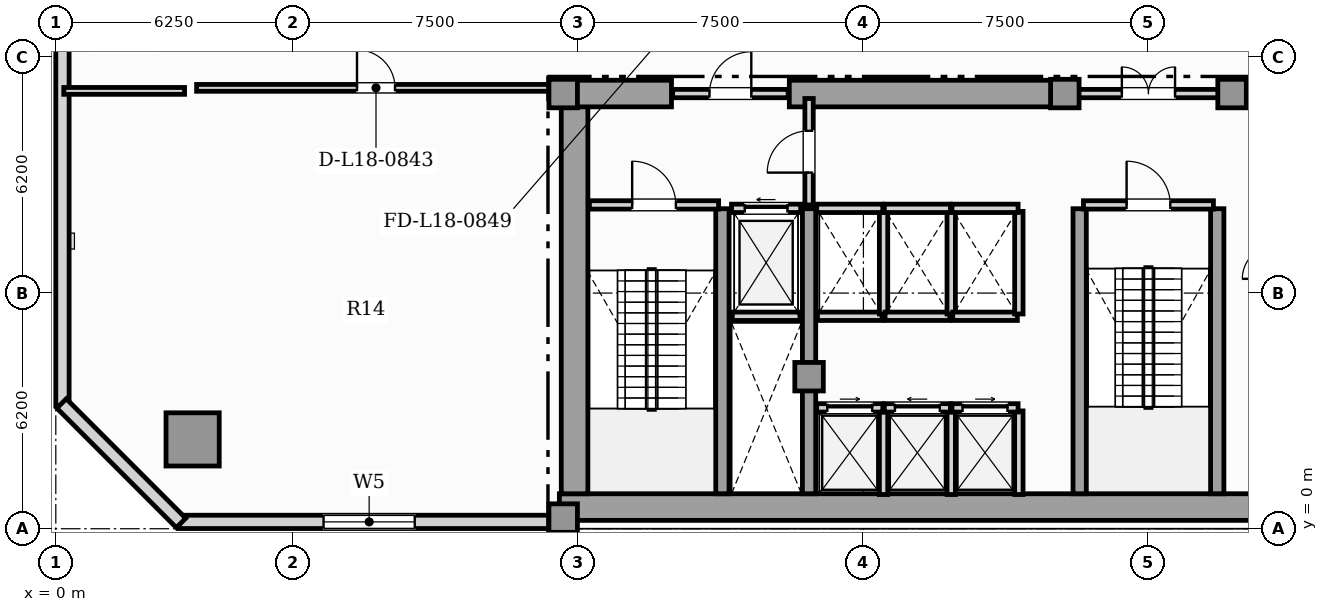
"""IFC4 building model, lengths in metres.
Left out: names, types, materials, properties, quantities, classifications, styles, units other than length and angle.
Written with IfcOpenShell. Run it as: python <this file> out.ifc"""

import sys

from ifc_helpers import new_model, si_unit, direction, frame, frame_2d, origin, origin_2d, place, context, subcontext, project, spatial, rectangle, hollow_rectangle, extrude, element, fill, save


model = new_model("IFC4")
c1 = context("Model", 3, precision=1e-05, world=origin(), true_north=direction((0.0, 1.0)))
c2 = subcontext(c1, "Body", "Model", "MODEL_VIEW")
j1 = project(units=[si_unit("LENGTHUNIT", "METRE"), si_unit("PLANEANGLEUNIT", "RADIAN")], contexts=[c1])
p1 = place(None, origin())
s1 = spatial("IfcSite", under=j1, at=p1, CompositionType="ELEMENT")
p2 = place(p1, origin())
s2 = spatial("IfcBuilding", under=s1, at=p2, CompositionType="ELEMENT")
p3 = place(p2, frame((0.0, 0.0, 76.0)))
s3 = spatial("IfcBuildingStorey", under=s2, at=p3, CompositionType="ELEMENT", Elevation=76.0)
p4 = place(p3, frame((13.25, 0.57, 0.0), z_axis=(0.0, 0.0, 1.0), x_axis=(1.0, 0.0, 0.0)))
e1 = element("IfcWall", 1, at=p4, inside=s3, PredefinedType="SHEAR", context=c2, shape_type="SweptSolid", body=[
    extrude(rectangle(XDim=31.0, YDim=0.7, at=frame_2d((15.5, 0.0))), origin(), (0.0, 0.0, 1.0), 4.8),
])
p5 = place(p3, frame((13.65, 0.92, 0.0), z_axis=(0.0, 0.0, 1.0), x_axis=(0.0, 1.0, 0.0)))
e2 = element("IfcWall", 2, at=p5, inside=s3, PredefinedType="SHEAR", context=c2, shape_type="SweptSolid", body=[
    extrude(rectangle(XDim=10.53, YDim=0.7, at=frame_2d((5.265, 0.0))), origin(), (0.0, 0.0, 1.0), 4.8),
])
p6 = place(p3, frame((13.25, 11.45, 0.0), z_axis=(0.0, 0.0, 1.0), x_axis=(1.0, 0.0, 0.0)))
e3 = element("IfcWall", 3, at=p6, inside=s3, PredefinedType="SHEAR", context=c2, shape_type="SweptSolid", body=[
    extrude(rectangle(XDim=2.95, YDim=0.7, at=frame_2d((1.475, 0.0))), origin(), (0.0, 0.0, 1.0), 4.8),
])
for number, where, z_axis, x_axis in (
    (4, (19.3, 11.45, 0.0), (0.0, 0.0, 1.0), (1.0, 0.0, 0.0)),
    (5, (30.9, 11.45, 0.0), (0.0, 0.0, 1.0), (1.0, 0.0, 0.0)),
):
    element("IfcWall", number, at=place(p3, frame(where, z_axis=z_axis, x_axis=x_axis)), inside=s3, PredefinedType="SHEAR", context=c2, shape_type="SweptSolid", body=[
        extrude(rectangle(XDim=7.3, YDim=0.7, at=frame_2d((3.65, 0.0))), origin(), (0.0, 0.0, 1.0), 4.8),
    ])
for number, where, z_axis, x_axis in (
    (6, (17.54, 0.92, 0.0), (0.0, 0.0, 1.0), (0.0, 1.0, 0.0)),
    (7, (19.82, 0.92, 0.0), (0.0, 0.0, 1.0), (0.0, 1.0, 0.0)),
    (8, (26.94, 0.92, 0.0), (0.0, 0.0, 1.0), (0.0, 1.0, 0.0)),
    (9, (30.56, 0.92, 0.0), (0.0, 0.0, 1.0), (0.0, 1.0, 0.0)),
):
    element("IfcWall", number, at=place(p3, frame(where, z_axis=z_axis, x_axis=x_axis)), inside=s3, PredefinedType="SHEAR", context=c2, shape_type="SweptSolid", body=[
        extrude(rectangle(XDim=7.5, YDim=0.35, at=frame_2d((3.75, 0.0))), origin(), (0.0, 0.0, 1.0), 4.8),
    ])
for number, where, z_axis, x_axis in (
    (10, (13.35, 0.28, 0.0), (0.0, 0.0, 1.0), (1.0, 0.0, 0.0)),
    (11, (13.35, 11.45, 0.0), (0.0, 0.0, 1.0), (1.0, 0.0, 0.0)),
    (12, (19.82, 4.0, 0.0), (0.0, 0.0, 1.0), (1.0, 0.0, 0.0)),
    (13, (26.55, 11.45, 0.0), (0.0, 0.0, 1.0), (1.0, 0.0, 0.0)),
    (14, (30.95, 11.45, 0.0), (0.0, 0.0, 1.0), (1.0, 0.0, 0.0)),
):
    element("IfcColumn", number, at=place(p3, frame(where, z_axis=z_axis, x_axis=x_axis)), inside=s3, PredefinedType="COLUMN", context=c2, shape_type="SweptSolid", body=[
        extrude(rectangle(XDim=0.75, YDim=0.75, at=origin_2d()), origin(), (0.0, 0.0, 1.0), 5.05),
    ])
p7 = place(p3, frame((3.6, 2.35, 0.0), z_axis=(0.0, 0.0, 1.0), x_axis=(1.0, 0.0, 0.0)))
e15 = element("IfcColumn", 15, at=p7, inside=s3, PredefinedType="USERDEFINED", context=c2, shape_type="SweptSolid", body=[
    extrude(hollow_rectangle(XDim=1.4, YDim=1.4, WallThickness=0.08, at=origin_2d()), origin(), (0.0, 0.0, 1.0), 5.05),
])
p8 = place(p3, frame((3.24, 0.18, 0.0), z_axis=(0.0, 0.0, 1.0), x_axis=(1.0, 0.0, 0.0)))
e16 = element("IfcWall", 16, at=p8, inside=s3, PredefinedType="SOLIDWALL", context=c2, shape_type="SweptSolid", body=[
    extrude(rectangle(XDim=10.01, YDim=0.35, at=frame_2d((5.005, 0.0))), origin(), (0.0, 0.0, 1.0), 4.8),
])
p9 = place(p8, frame((3.805, 0.0, 0.85)))
e17 = element("IfcOpeningElement", 17, at=p9, cuts=e16, PredefinedType="OPENING", context=c2, shape_type="SweptSolid", body=[
    extrude(rectangle(XDim=2.4, YDim=2.0, at=frame_2d((1.2, 1.0))), frame((0.0, 0.185, 0.0), z_axis=(0.0, -1.0, 0.0), x_axis=(1.0, 0.0, 0.0)), (0.0, 0.0, 1.0), 0.37),
])
p10 = place(p3, frame((0.175, 43.16, 0.0), z_axis=(0.0, 0.0, 1.0), x_axis=(0.0, -1.0, 0.0)))
e18 = element("IfcWall", 18, at=p10, inside=s3, PredefinedType="SOLIDWALL", context=c2, shape_type="SweptSolid", body=[
    extrude(rectangle(XDim=39.92, YDim=0.35, at=frame_2d((19.96, 0.0))), origin(), (0.0, 0.0, 1.0), 4.8),
])
p11 = place(p10, frame((20.24, 0.0, 0.85)))
e19 = element("IfcOpeningElement", 19, at=p11, cuts=e18, PredefinedType="OPENING", context=c2, shape_type="SweptSolid", body=[
    extrude(rectangle(XDim=2.4, YDim=2.0, at=frame_2d((1.2, 1.0))), frame((0.0, 0.185, 0.0), z_axis=(0.0, -1.0, 0.0), x_axis=(1.0, 0.0, 0.0)), (0.0, 0.0, 1.0), 0.37),
])
p12 = place(p3, frame((0.152, 3.295, 0.0), z_axis=(0.0, 0.0, 1.0), x_axis=(0.707106781187, -0.707106781187, 0.0)))
e20 = element("IfcWall", 20, at=p12, inside=s3, PredefinedType="SOLIDWALL", context=c2, shape_type="SweptSolid", body=[
    extrude(rectangle(XDim=4.445, YDim=0.35, at=frame_2d((2.223, 0.0))), origin(), (0.0, 0.0, 1.0), 4.8),
])
p13 = place(p3, frame((17.8, 5.59, 0.0), z_axis=(0.0, 0.0, 1.0), x_axis=(1.0, 0.0, 0.0)))
e21 = element("IfcWall", 21, at=p13, inside=s3, PredefinedType="SOLIDWALL", context=c2, shape_type="SweptSolid", body=[
    extrude(rectangle(XDim=1.78, YDim=0.22, at=frame_2d((0.89, 0.0))), origin(), (0.0, 0.0, 1.0), 4.8),
])
p14 = place(p3, frame((17.78, 8.43, 0.0), z_axis=(0.0, 0.0, 1.0), x_axis=(1.0, 0.0, 0.0)))
e22 = element("IfcWall", 22, at=p14, inside=s3, PredefinedType="SOLIDWALL", context=c2, shape_type="SweptSolid", body=[
    extrude(rectangle(XDim=1.82, YDim=0.22, at=frame_2d((0.91, 0.0))), origin(), (0.0, 0.0, 1.0), 4.8),
])
p15 = place(p14, frame((0.35, 0.0, 0.0)))
e23 = element("IfcOpeningElement", 23, at=p15, cuts=e22, PredefinedType="OPENING", context=c2, shape_type="SweptSolid", body=[
    extrude(rectangle(XDim=1.12, YDim=2.25, at=frame_2d((0.56, 1.125))), frame((0.0, 0.12, 0.0), z_axis=(0.0, -1.0, 0.0), x_axis=(1.0, 0.0, 0.0)), (0.0, 0.0, 1.0), 0.24),
])
p16 = place(p3, frame((21.78, 0.9, 0.0), z_axis=(0.0, 0.0, 1.0), x_axis=(0.0, 1.0, 0.0)))
e24 = element("IfcWall", 24, at=p16, inside=s3, PredefinedType="SOLIDWALL", context=c2, shape_type="SweptSolid", body=[
    extrude(rectangle(XDim=2.2, YDim=0.22, at=frame_2d((1.1, 0.0))), origin(), (0.0, 0.0, 1.0), 4.8),
])
p17 = place(p3, frame((20.02, 3.18, 0.0), z_axis=(0.0, 0.0, 1.0), x_axis=(1.0, 0.0, 0.0)))
e25 = element("IfcWall", 25, at=p17, inside=s3, PredefinedType="SOLIDWALL", context=c2, shape_type="SweptSolid", body=[
    extrude(rectangle(XDim=1.74, YDim=0.22, at=frame_2d((0.87, 0.0))), origin(), (0.0, 0.0, 1.0), 4.8),
])
p18 = place(p17, frame((0.28, 0.0, 0.0)))
e26 = element("IfcOpeningElement", 26, at=p18, cuts=e25, PredefinedType="OPENING", context=c2, shape_type="SweptSolid", body=[
    extrude(rectangle(XDim=1.18, YDim=2.2, at=frame_2d((0.59, 1.1))), frame((0.0, 0.12, 0.0), z_axis=(0.0, -1.0, 0.0), x_axis=(1.0, 0.0, 0.0)), (0.0, 0.0, 1.0), 0.24),
])
p19 = place(p3, frame((23.56, 0.9, 0.0), z_axis=(0.0, 0.0, 1.0), x_axis=(0.0, 1.0, 0.0)))
e27 = element("IfcWall", 27, at=p19, inside=s3, PredefinedType="SOLIDWALL", context=c2, shape_type="SweptSolid", body=[
    extrude(rectangle(XDim=2.2, YDim=0.22, at=frame_2d((1.1, 0.0))), origin(), (0.0, 0.0, 1.0), 4.8),
])
p20 = place(p3, frame((21.8, 3.18, 0.0), z_axis=(0.0, 0.0, 1.0), x_axis=(1.0, 0.0, 0.0)))
e28 = element("IfcWall", 28, at=p20, inside=s3, PredefinedType="SOLIDWALL", context=c2, shape_type="SweptSolid", body=[
    extrude(rectangle(XDim=1.74, YDim=0.22, at=frame_2d((0.87, 0.0))), origin(), (0.0, 0.0, 1.0), 4.8),
])
p21 = place(p20, frame((0.28, 0.0, 0.0)))
e29 = element("IfcOpeningElement", 29, at=p21, cuts=e28, PredefinedType="OPENING", context=c2, shape_type="SweptSolid", body=[
    extrude(rectangle(XDim=1.18, YDim=2.2, at=frame_2d((0.59, 1.1))), frame((0.0, 0.12, 0.0), z_axis=(0.0, -1.0, 0.0), x_axis=(1.0, 0.0, 0.0)), (0.0, 0.0, 1.0), 0.24),
])
p22 = place(p3, frame((25.34, 0.9, 0.0), z_axis=(0.0, 0.0, 1.0), x_axis=(0.0, 1.0, 0.0)))
e30 = element("IfcWall", 30, at=p22, inside=s3, PredefinedType="SOLIDWALL", context=c2, shape_type="SweptSolid", body=[
    extrude(rectangle(XDim=2.2, YDim=0.22, at=frame_2d((1.1, 0.0))), origin(), (0.0, 0.0, 1.0), 4.8),
])
p23 = place(p3, frame((23.58, 3.18, 0.0), z_axis=(0.0, 0.0, 1.0), x_axis=(1.0, 0.0, 0.0)))
e31 = element("IfcWall", 31, at=p23, inside=s3, PredefinedType="SOLIDWALL", context=c2, shape_type="SweptSolid", body=[
    extrude(rectangle(XDim=1.74, YDim=0.22, at=frame_2d((0.87, 0.0))), origin(), (0.0, 0.0, 1.0), 4.8),
])
p24 = place(p23, frame((0.28, 0.0, 0.0)))
e32 = element("IfcOpeningElement", 32, at=p24, cuts=e31, PredefinedType="OPENING", context=c2, shape_type="SweptSolid", body=[
    extrude(rectangle(XDim=1.18, YDim=2.2, at=frame_2d((0.59, 1.1))), frame((0.0, 0.12, 0.0), z_axis=(0.0, -1.0, 0.0), x_axis=(1.0, 0.0, 0.0)), (0.0, 0.0, 1.0), 0.24),
])
p25 = place(p3, frame((20.04, 5.59, 0.0), z_axis=(0.0, 0.0, 1.0), x_axis=(1.0, 0.0, 0.0)))
e33 = element("IfcWall", 33, at=p25, inside=s3, PredefinedType="SOLIDWALL", context=c2, shape_type="SweptSolid", body=[
    extrude(rectangle(XDim=1.7, YDim=0.22, at=frame_2d((0.85, 0.0))), origin(), (0.0, 0.0, 1.0), 4.8),
])
p26 = place(p3, frame((21.78, 5.65, 0.0), z_axis=(0.0, 0.0, 1.0), x_axis=(0.0, 1.0, 0.0)))
e34 = element("IfcWall", 34, at=p26, inside=s3, PredefinedType="SOLIDWALL", context=c2, shape_type="SweptSolid", body=[
    extrude(rectangle(XDim=2.7, YDim=0.22, at=frame_2d((1.35, 0.0))), origin(), (0.0, 0.0, 1.0), 4.8),
])
p27 = place(p3, frame((20.02, 8.43, 0.0), z_axis=(0.0, 0.0, 1.0), x_axis=(1.0, 0.0, 0.0)))
e35 = element("IfcWall", 35, at=p27, inside=s3, PredefinedType="SOLIDWALL", context=c2, shape_type="SweptSolid", body=[
    extrude(rectangle(XDim=1.74, YDim=0.22, at=frame_2d((0.87, 0.0))), origin(), (0.0, 0.0, 1.0), 4.8),
])
p28 = place(p3, frame((21.82, 5.59, 0.0), z_axis=(0.0, 0.0, 1.0), x_axis=(1.0, 0.0, 0.0)))
e36 = element("IfcWall", 36, at=p28, inside=s3, PredefinedType="SOLIDWALL", context=c2, shape_type="SweptSolid", body=[
    extrude(rectangle(XDim=1.7, YDim=0.22, at=frame_2d((0.85, 0.0))), origin(), (0.0, 0.0, 1.0), 4.8),
])
p29 = place(p3, frame((23.56, 5.65, 0.0), z_axis=(0.0, 0.0, 1.0), x_axis=(0.0, 1.0, 0.0)))
e37 = element("IfcWall", 37, at=p29, inside=s3, PredefinedType="SOLIDWALL", context=c2, shape_type="SweptSolid", body=[
    extrude(rectangle(XDim=2.7, YDim=0.22, at=frame_2d((1.35, 0.0))), origin(), (0.0, 0.0, 1.0), 4.8),
])
p30 = place(p3, frame((21.8, 8.43, 0.0), z_axis=(0.0, 0.0, 1.0), x_axis=(1.0, 0.0, 0.0)))
e38 = element("IfcWall", 38, at=p30, inside=s3, PredefinedType="SOLIDWALL", context=c2, shape_type="SweptSolid", body=[
    extrude(rectangle(XDim=1.74, YDim=0.22, at=frame_2d((0.87, 0.0))), origin(), (0.0, 0.0, 1.0), 4.8),
])
p31 = place(p3, frame((23.6, 5.59, 0.0), z_axis=(0.0, 0.0, 1.0), x_axis=(1.0, 0.0, 0.0)))
e39 = element("IfcWall", 39, at=p31, inside=s3, PredefinedType="SOLIDWALL", context=c2, shape_type="SweptSolid", body=[
    extrude(rectangle(XDim=1.7, YDim=0.22, at=frame_2d((0.85, 0.0))), origin(), (0.0, 0.0, 1.0), 4.8),
])
p32 = place(p3, frame((25.34, 5.65, 0.0), z_axis=(0.0, 0.0, 1.0), x_axis=(0.0, 1.0, 0.0)))
e40 = element("IfcWall", 40, at=p32, inside=s3, PredefinedType="SOLIDWALL", context=c2, shape_type="SweptSolid", body=[
    extrude(rectangle(XDim=2.7, YDim=0.22, at=frame_2d((1.35, 0.0))), origin(), (0.0, 0.0, 1.0), 4.8),
])
p33 = place(p3, frame((23.58, 8.43, 0.0), z_axis=(0.0, 0.0, 1.0), x_axis=(1.0, 0.0, 0.0)))
e41 = element("IfcWall", 41, at=p33, inside=s3, PredefinedType="SOLIDWALL", context=c2, shape_type="SweptSolid", body=[
    extrude(rectangle(XDim=1.74, YDim=0.22, at=frame_2d((0.87, 0.0))), origin(), (0.0, 0.0, 1.0), 4.8),
])
p34 = place(p3, frame((14.04, 8.52, 0.0), z_axis=(0.0, 0.0, 1.0), x_axis=(1.0, 0.0, 0.0)))
e42 = element("IfcWall", 42, at=p34, inside=s3, PredefinedType="SOLIDWALL", context=c2, shape_type="SweptSolid", body=[
    extrude(rectangle(XDim=3.4, YDim=0.22, at=frame_2d((1.7, 0.0))), origin(), (0.0, 0.0, 1.0), 4.8),
])
p35 = place(p34, frame((1.125, 0.0, 0.0)))
e43 = element("IfcOpeningElement", 43, at=p35, cuts=e42, PredefinedType="OPENING", context=c2, shape_type="SweptSolid", body=[
    extrude(rectangle(XDim=1.15, YDim=2.2, at=frame_2d((0.575, 1.1))), frame((0.0, 0.12, 0.0), z_axis=(0.0, -1.0, 0.0), x_axis=(1.0, 0.0, 0.0)), (0.0, 0.0, 1.0), 0.24),
])
p36 = place(p3, frame((27.04, 8.52, 0.0), z_axis=(0.0, 0.0, 1.0), x_axis=(1.0, 0.0, 0.0)))
e44 = element("IfcWall", 44, at=p36, inside=s3, PredefinedType="SOLIDWALL", context=c2, shape_type="SweptSolid", body=[
    extrude(rectangle(XDim=3.42, YDim=0.22, at=frame_2d((1.71, 0.0))), origin(), (0.0, 0.0, 1.0), 4.8),
])
p37 = place(p36, frame((1.135, 0.0, 0.0)))
e45 = element("IfcOpeningElement", 45, at=p37, cuts=e44, PredefinedType="OPENING", context=c2, shape_type="SweptSolid", body=[
    extrude(rectangle(XDim=1.15, YDim=2.2, at=frame_2d((0.575, 1.1))), frame((0.0, 0.12, 0.0), z_axis=(0.0, -1.0, 0.0), x_axis=(1.0, 0.0, 0.0)), (0.0, 0.0, 1.0), 0.24),
])
p38 = place(p3, frame((19.82, 8.52, 0.0), z_axis=(0.0, 0.0, 1.0), x_axis=(0.0, 1.0, 0.0)))
e46 = element("IfcWall", 46, at=p38, inside=s3, PredefinedType="SOLIDWALL", context=c2, shape_type="SweptSolid", body=[
    extrude(rectangle(XDim=2.8, YDim=0.22, at=frame_2d((1.4, 0.0))), origin(), (0.0, 0.0, 1.0), 4.256),
])
p39 = place(p38, frame((0.85, 0.0, 0.0)))
e47 = element("IfcOpeningElement", 47, at=p39, cuts=e46, PredefinedType="OPENING", context=c2, shape_type="SweptSolid", body=[
    extrude(rectangle(XDim=1.1, YDim=2.2, at=frame_2d((0.55, 1.1))), frame((0.0, 0.12, 0.0), z_axis=(0.0, -1.0, 0.0), x_axis=(1.0, 0.0, 0.0)), (0.0, 0.0, 1.0), 0.24),
])
p40 = place(p3, frame((16.23, 11.45, 0.0), z_axis=(0.0, 0.0, 1.0), x_axis=(1.0, 0.0, 0.0)))
e48 = element("IfcWall", 48, at=p40, inside=s3, PredefinedType="SOLIDWALL", context=c2, shape_type="SweptSolid", body=[
    extrude(rectangle(XDim=3.04, YDim=0.22, at=frame_2d((1.52, 0.0))), origin(), (0.0, 0.0, 1.0), 4.8),
])
p41 = place(p40, frame((0.97, 0.0, 0.0)))
e49 = element("IfcOpeningElement", 49, at=p41, cuts=e48, PredefinedType="OPENING", context=c2, shape_type="SweptSolid", body=[
    extrude(rectangle(XDim=1.1, YDim=2.2, at=frame_2d((0.55, 1.1))), frame((0.0, 0.12, 0.0), z_axis=(0.0, -1.0, 0.0), x_axis=(1.0, 0.0, 0.0)), (0.0, 0.0, 1.0), 0.24),
])
p42 = place(p3, frame((26.63, 11.45, 0.0), z_axis=(0.0, 0.0, 1.0), x_axis=(1.0, 0.0, 0.0)))
e50 = element("IfcWall", 50, at=p42, inside=s3, PredefinedType="SOLIDWALL", context=c2, shape_type="SweptSolid", body=[
    extrude(rectangle(XDim=4.24, YDim=0.22, at=frame_2d((2.12, 0.0))), origin(), (0.0, 0.0, 1.0), 4.8),
])
p43 = place(p42, frame((1.42, 0.0, 0.0)))
e51 = element("IfcOpeningElement", 51, at=p43, cuts=e50, PredefinedType="OPENING", context=c2, shape_type="SweptSolid", body=[
    extrude(rectangle(XDim=1.4, YDim=2.2, at=frame_2d((0.7, 1.1))), frame((0.0, 0.12, 0.0), z_axis=(0.0, -1.0, 0.0), x_axis=(1.0, 0.0, 0.0)), (0.0, 0.0, 1.0), 0.24),
])
p44 = place(p3, frame((3.705, 11.6, 0.0), z_axis=(0.0, 0.0, 1.0), x_axis=(1.0, 0.0, 0.0)))
e52 = element("IfcWall", 52, at=p44, inside=s3, PredefinedType="PARTITIONING", context=c2, shape_type="SweptSolid", body=[
    extrude(rectangle(XDim=9.44, YDim=0.18, at=frame_2d((4.72, 0.0))), origin(), (0.0, 0.0, 1.0), 4.8),
])
p45 = place(p44, frame((4.22, 0.0, 0.0)))
e53 = element("IfcOpeningElement", 53, at=p45, cuts=e52, PredefinedType="OPENING", context=c2, shape_type="SweptSolid", body=[
    extrude(rectangle(XDim=1.0, YDim=2.15, at=frame_2d((0.5, 1.075))), frame((0.0, 0.1, 0.0), z_axis=(0.0, -1.0, 0.0), x_axis=(1.0, 0.0, 0.0)), (0.0, 0.0, 1.0), 0.2),
])
p46 = place(p3, frame((0.21, 11.52, 0.0), z_axis=(0.0, 0.0, 1.0), x_axis=(1.0, 0.0, 0.0)))
e54 = element("IfcWall", 54, at=p46, inside=s3, PredefinedType="PARTITIONING", context=c2, shape_type="SweptSolid", body=[
    extrude(rectangle(XDim=3.178, YDim=0.18, at=frame_2d((1.589, 0.0))), origin(), (0.0, 0.0, 1.0), 4.8),
])
p47 = place(p9, origin())
e55 = element("IfcWindow", 55, at=p47, inside=s3, PartitioningType="SINGLE_PANEL", PredefinedType="WINDOW", context=c2, shape_type="SweptSolid", body=[
    extrude(rectangle(XDim=2.4, YDim=2.0, at=frame_2d((1.2, 1.0))), frame((0.0, 0.03, 0.0), z_axis=(0.0, -1.0, 0.0), x_axis=(1.0, 0.0, 0.0)), (0.0, 0.0, 1.0), 0.06),
])
fill(e17, e55)
p48 = place(p15, origin())
e56 = element("IfcDoor", 56, at=p48, inside=s3, OperationType="SLIDING_TO_LEFT", PredefinedType="DOOR", context=c2, shape_type="SweptSolid", body=[
    extrude(rectangle(XDim=1.12, YDim=2.25, at=frame_2d((0.56, 1.125))), frame((0.0, 0.025, 0.0), z_axis=(0.0, -1.0, 0.0), x_axis=(1.0, 0.0, 0.0)), (0.0, 0.0, 1.0), 0.05),
])
fill(e23, e56)
p49 = place(p18, origin())
e57 = element("IfcDoor", 57, at=p49, inside=s3, OperationType="SLIDING_TO_RIGHT", PredefinedType="DOOR", context=c2, shape_type="SweptSolid", body=[
    extrude(rectangle(XDim=1.18, YDim=2.2, at=frame_2d((0.59, 1.1))), frame((0.0, 0.025, 0.0), z_axis=(0.0, -1.0, 0.0), x_axis=(1.0, 0.0, 0.0)), (0.0, 0.0, 1.0), 0.05),
])
fill(e26, e57)
p50 = place(p21, origin())
e58 = element("IfcDoor", 58, at=p50, inside=s3, OperationType="SLIDING_TO_LEFT", PredefinedType="DOOR", context=c2, shape_type="SweptSolid", body=[
    extrude(rectangle(XDim=1.18, YDim=2.2, at=frame_2d((0.59, 1.1))), frame((0.0, 0.025, 0.0), z_axis=(0.0, -1.0, 0.0), x_axis=(1.0, 0.0, 0.0)), (0.0, 0.0, 1.0), 0.05),
])
fill(e29, e58)
p51 = place(p24, origin())
e59 = element("IfcDoor", 59, at=p51, inside=s3, OperationType="SLIDING_TO_RIGHT", PredefinedType="DOOR", context=c2, shape_type="SweptSolid", body=[
    extrude(rectangle(XDim=1.18, YDim=2.2, at=frame_2d((0.59, 1.1))), frame((0.0, 0.025, 0.0), z_axis=(0.0, -1.0, 0.0), x_axis=(1.0, 0.0, 0.0)), (0.0, 0.0, 1.0), 0.05),
])
fill(e32, e59)
p52 = place(p35, origin())
e60 = element("IfcDoor", 60, at=p52, inside=s3, OperationType="SINGLE_SWING_LEFT", PredefinedType="DOOR", context=c2, shape_type="SweptSolid", body=[
    extrude(rectangle(XDim=1.15, YDim=2.2, at=frame_2d((0.575, 1.1))), frame((0.0, 0.025, 0.0), z_axis=(0.0, -1.0, 0.0), x_axis=(1.0, 0.0, 0.0)), (0.0, 0.0, 1.0), 0.05),
])
fill(e43, e60)
p53 = place(p37, origin())
e61 = element("IfcDoor", 61, at=p53, inside=s3, OperationType="SINGLE_SWING_LEFT", PredefinedType="DOOR", context=c2, shape_type="SweptSolid", body=[
    extrude(rectangle(XDim=1.15, YDim=2.2, at=frame_2d((0.575, 1.1))), frame((0.0, 0.025, 0.0), z_axis=(0.0, -1.0, 0.0), x_axis=(1.0, 0.0, 0.0)), (0.0, 0.0, 1.0), 0.05),
])
fill(e45, e61)
p54 = place(p39, origin())
e62 = element("IfcDoor", 62, at=p54, inside=s3, OperationType="SINGLE_SWING_LEFT", PredefinedType="DOOR", context=c2, shape_type="SweptSolid", body=[
    extrude(rectangle(XDim=1.1, YDim=2.2, at=frame_2d((0.55, 1.1))), frame((0.0, 0.025, 0.0), z_axis=(0.0, -1.0, 0.0), x_axis=(1.0, 0.0, 0.0)), (0.0, 0.0, 1.0), 0.05),
])
fill(e47, e62)
p55 = place(p41, origin())
e63 = element("IfcDoor", 63, at=p55, inside=s3, OperationType="SINGLE_SWING_RIGHT", PredefinedType="DOOR", context=c2, shape_type="SweptSolid", body=[
    extrude(rectangle(XDim=1.1, YDim=2.2, at=frame_2d((0.55, 1.1))), frame((0.0, 0.025, 0.0), z_axis=(0.0, -1.0, 0.0), x_axis=(1.0, 0.0, 0.0)), (0.0, 0.0, 1.0), 0.05),
])
fill(e49, e63)
p56 = place(p43, origin())
e64 = element("IfcDoor", 64, at=p56, inside=s3, OperationType="DOUBLE_DOOR_SINGLE_SWING", PredefinedType="DOOR", context=c2, shape_type="SweptSolid", body=[
    extrude(rectangle(XDim=1.4, YDim=2.2, at=frame_2d((0.7, 1.1))), frame((0.0, 0.025, 0.0), z_axis=(0.0, -1.0, 0.0), x_axis=(1.0, 0.0, 0.0)), (0.0, 0.0, 1.0), 0.05),
])
fill(e51, e64)
p57 = place(p45, origin())
e65 = element("IfcDoor", 65, at=p57, inside=s3, OperationType="SINGLE_SWING_LEFT", PredefinedType="DOOR", context=c2, shape_type="SweptSolid", body=[
    extrude(rectangle(XDim=1.0, YDim=2.15, at=frame_2d((0.5, 1.075))), frame((0.0, 0.025, 0.0), z_axis=(0.0, -1.0, 0.0), x_axis=(1.0, 0.0, 0.0)), (0.0, 0.0, 1.0), 0.05),
])
fill(e53, e65)
save(model, sys.argv[1])
